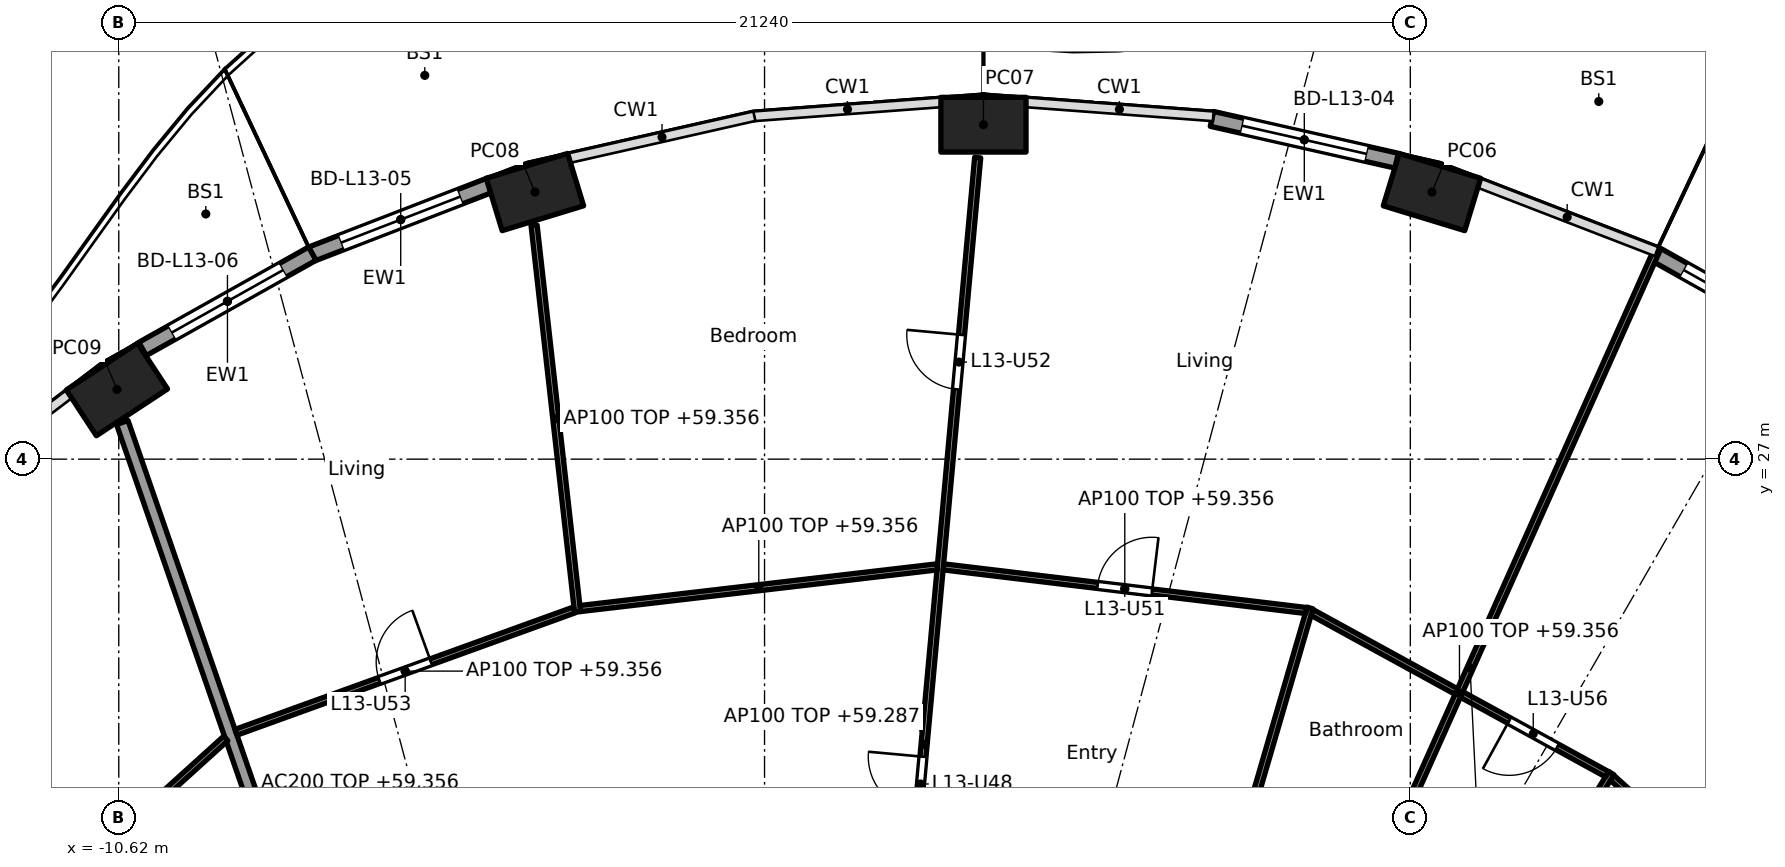
"""IFC4 building model, lengths in metres.
Left out: names, types, materials, properties, quantities, classifications, styles, units other than length and angle.
Written with IfcOpenShell. Run it as: python <this file> out.ifc"""

import sys

from ifc_helpers import new_model, si_unit, direction, frame, frame_2d, origin, origin_2d, place, context, subcontext, project, spatial, rectangle, hollow_rectangle, extrude, element, fill, save


model = new_model("IFC4")
c1 = context("Model", 3, precision=1e-05, world=origin(), true_north=direction((0.0, 1.0)))
c2 = subcontext(c1, "Body", "Model", "MODEL_VIEW")
j1 = project(units=[si_unit("LENGTHUNIT", "METRE"), si_unit("PLANEANGLEUNIT", "RADIAN")], contexts=[c1])
p1 = place(None, origin())
s1 = spatial("IfcSite", under=j1, at=p1, CompositionType="ELEMENT")
p2 = place(p1, origin())
s2 = spatial("IfcBuilding", under=s1, at=p2, CompositionType="ELEMENT")
p3 = place(p2, frame((0.0, 0.0, 56.6)))
s3 = spatial("IfcBuildingStorey", under=s2, at=p3, CompositionType="ELEMENT", Elevation=56.6)
for number, where, z_axis, x_axis in (
    (1, (10.976, 31.393, 0.0), (0.0, 0.0, 1.0), (-0.957, 0.292, 0.0)),
    (2, (3.6, 32.5, 0.0), (0.0, 0.0, 1.0), (-1.0, 0.0, 0.0)),
    (3, (-3.776, 31.393, 0.0), (0.0, 0.0, 1.0), (-0.957, -0.292, 0.0)),
    (4, (-10.65, 28.146, 0.0), (0.0, 0.0, 1.0), (-0.836, -0.549, 0.0)),
):
    element("IfcColumn", number, at=place(p3, frame(where, z_axis=z_axis, x_axis=x_axis)), inside=s3, PredefinedType="COLUMN", context=c2, shape_type="SweptSolid", body=[
        extrude(hollow_rectangle(XDim=1.4, YDim=0.9, WallThickness=0.05, at=origin_2d()), origin(), (0.0, 0.0, 1.0), 3.7),
    ])
p4 = place(p3, frame((14.637, 30.379, 0.0), z_axis=(0.0, 0.0, 1.0), x_axis=(0.872102558443, -0.489323132048, 0.0)))
e5 = element("IfcWall", 5, at=p4, inside=s3, PredefinedType="SOLIDWALL", context=c2, shape_type="SweptSolid", body=[
    extrude(rectangle(XDim=3.201, YDim=0.25, at=frame_2d((1.601, 0.0))), origin(), (0.0, 0.0, 1.0), 3.44),
])
p5 = place(p4, frame((0.551, 0.0, 0.0)))
e6 = element("IfcOpeningElement", 6, at=p5, cuts=e5, PredefinedType="OPENING", context=c2, shape_type="SweptSolid", body=[
    extrude(rectangle(XDim=2.1, YDim=2.4, at=frame_2d((1.05, 1.2))), frame((0.0, 0.135, 0.0), z_axis=(0.0, -1.0, 0.0), x_axis=(1.0, 0.0, 0.0)), (0.0, 0.0, 1.0), 0.27),
])
p6 = place(p3, frame((7.358, 32.596, 0.0), z_axis=(0.0, 0.0, 1.0), x_axis=(0.97533495413, -0.220729987208, 0.0)))
e7 = element("IfcWall", 7, at=p6, inside=s3, PredefinedType="SOLIDWALL", context=c2, shape_type="SweptSolid", body=[
    extrude(rectangle(XDim=3.115, YDim=0.25, at=frame_2d((1.557, 0.0))), origin(), (0.0, 0.0, 1.0), 3.44),
])
p7 = place(p6, frame((0.507, 0.0, 0.0)))
e8 = element("IfcOpeningElement", 8, at=p7, cuts=e7, PredefinedType="OPENING", context=c2, shape_type="SweptSolid", body=[
    extrude(rectangle(XDim=2.1, YDim=2.4, at=frame_2d((1.05, 1.2))), frame((0.0, 0.135, 0.0), z_axis=(0.0, -1.0, 0.0), x_axis=(1.0, 0.0, 0.0)), (0.0, 0.0, 1.0), 0.27),
])
p8 = place(p3, frame((-7.453, 30.371, 0.0), z_axis=(0.0, 0.0, 1.0), x_axis=(0.932809381943, 0.360370166577, 0.0)))
e9 = element("IfcWall", 9, at=p8, inside=s3, PredefinedType="SOLIDWALL", context=c2, shape_type="SweptSolid", body=[
    extrude(rectangle(XDim=3.151, YDim=0.25, at=frame_2d((1.575, 0.0))), origin(), (0.0, 0.0, 1.0), 3.44),
])
p9 = place(p8, frame((0.525, 0.0, 0.0)))
e10 = element("IfcOpeningElement", 10, at=p9, cuts=e9, PredefinedType="OPENING", context=c2, shape_type="SweptSolid", body=[
    extrude(rectangle(XDim=2.1, YDim=2.4, at=frame_2d((1.05, 1.2))), frame((0.0, 0.135, 0.0), z_axis=(0.0, -1.0, 0.0), x_axis=(1.0, 0.0, 0.0)), (0.0, 0.0, 1.0), 0.27),
])
p10 = place(p3, frame((-10.228, 28.812, 0.0), z_axis=(0.0, 0.0, 1.0), x_axis=(0.872084295691, 0.489355679653, 0.0)))
e11 = element("IfcWall", 11, at=p10, inside=s3, PredefinedType="SOLIDWALL", context=c2, shape_type="SweptSolid", body=[
    extrude(rectangle(XDim=3.201, YDim=0.25, at=frame_2d((1.601, 0.0))), origin(), (0.0, 0.0, 1.0), 3.44),
])
p11 = place(p10, frame((0.551, 0.0, 0.0)))
e12 = element("IfcOpeningElement", 12, at=p11, cuts=e11, PredefinedType="OPENING", context=c2, shape_type="SweptSolid", body=[
    extrude(rectangle(XDim=2.1, YDim=2.4, at=frame_2d((1.05, 1.2))), frame((0.0, 0.135, 0.0), z_axis=(0.0, -1.0, 0.0), x_axis=(1.0, 0.0, 0.0)), (0.0, 0.0, 1.0), 0.27),
])
p12 = place(p3, frame((-6.139, 14.829, 0.0), z_axis=(0.0, 0.0, 1.0), x_axis=(-0.327178799566, 0.944962450637, 0.0)))
e13 = element("IfcWall", 13, at=p12, inside=s3, PredefinedType="PARTITIONING", context=c2, shape_type="SweptSolid", body=[
    extrude(rectangle(XDim=13.517, YDim=0.2, at=frame_2d((6.759, 0.0))), origin(), (0.0, 0.0, 1.0), 2.756),
])
p13 = place(p3, frame((18.285, 17.877, 0.0), z_axis=(0.0, 0.0, 1.0), x_axis=(-0.745806142791, 0.666163041136, 0.0)))
e14 = element("IfcWall", 14, at=p13, inside=s3, PredefinedType="PARTITIONING", context=c2, shape_type="SweptSolid", body=[
    extrude(rectangle(XDim=5.831, YDim=0.1, at=frame_2d((2.915, 0.0))), origin(), (0.0, 0.0, 1.0), 2.756),
])
p14 = place(p13, frame((1.008, 0.0, 0.0)))
e15 = element("IfcOpeningElement", 15, at=p14, cuts=e14, PredefinedType="OPENING", context=c2, shape_type="SweptSolid", body=[
    extrude(rectangle(XDim=0.9, YDim=2.1, at=frame_2d((0.45, 1.05))), frame((0.0, 0.06, 0.0), z_axis=(0.0, -1.0, 0.0), x_axis=(1.0, 0.0, 0.0)), (0.0, 0.0, 1.0), 0.12),
])
p15 = place(p3, frame((10.003, 15.503, 0.0), z_axis=(0.0, 0.0, 1.0), x_axis=(0.52645953022, 0.850200189979, 0.0)))
e16 = element("IfcWall", 16, at=p15, inside=s3, PredefinedType="PARTITIONING", context=c2, shape_type="SweptSolid", body=[
    extrude(rectangle(XDim=7.45, YDim=0.1, at=frame_2d((3.725, 0.0))), origin(), (0.0, 0.0, 1.0), 2.756),
])
p16 = place(p3, frame((13.855, 21.818, 0.0), z_axis=(0.0, 0.0, 1.0), x_axis=(-0.876794415294, 0.480865421203, 0.0)))
e17 = element("IfcWall", 17, at=p16, inside=s3, PredefinedType="PARTITIONING", context=c2, shape_type="SweptSolid", body=[
    extrude(rectangle(XDim=5.536, YDim=0.1, at=frame_2d((2.768, 0.0))), origin(), (0.0, 0.0, 1.0), 2.756),
])
p17 = place(p16, frame((0.934, 0.0, 0.0)))
e18 = element("IfcOpeningElement", 18, at=p17, cuts=e17, PredefinedType="OPENING", context=c2, shape_type="SweptSolid", body=[
    extrude(rectangle(XDim=0.9, YDim=2.1, at=frame_2d((0.45, 1.05))), frame((0.0, 0.06, 0.0), z_axis=(0.0, -1.0, 0.0), x_axis=(1.0, 0.0, 0.0)), (0.0, 0.0, 1.0), 0.12),
])
p18 = place(p3, frame((8.524, 16.676, 0.0), z_axis=(0.0, 0.0, 1.0), x_axis=(0.408065177262, 0.912952797852, 0.0)))
e19 = element("IfcWall", 19, at=p18, inside=s3, PredefinedType="PARTITIONING", context=c2, shape_type="SweptSolid", body=[
    extrude(rectangle(XDim=15.089, YDim=0.1, at=frame_2d((7.544, 0.0))), origin(), (0.0, 0.0, 1.0), 2.837),
])
p19 = place(p3, frame((6.137, 14.83, 0.0), z_axis=(0.0, 0.0, 1.0), x_axis=(0.279843546189, 0.960045618529, 0.0)))
e20 = element("IfcWall", 20, at=p19, inside=s3, PredefinedType="PARTITIONING", context=c2, shape_type="SweptSolid", body=[
    extrude(rectangle(XDim=10.127, YDim=0.1, at=frame_2d((5.063, 0.0))), origin(), (0.0, 0.0, 1.0), 3.44),
])
p20 = place(p19, frame((1.334, 0.0, 0.0)))
e21 = element("IfcOpeningElement", 21, at=p20, cuts=e20, PredefinedType="OPENING", context=c2, shape_type="SweptSolid", body=[
    extrude(rectangle(XDim=0.9, YDim=2.1, at=frame_2d((0.45, 1.05))), frame((0.0, 0.06, 0.0), z_axis=(0.0, -1.0, 0.0), x_axis=(1.0, 0.0, 0.0)), (0.0, 0.0, 1.0), 0.12),
])
p21 = place(p19, frame((6.091, 0.0, 0.0)))
e22 = element("IfcOpeningElement", 22, at=p21, cuts=e20, PredefinedType="OPENING", context=c2, shape_type="SweptSolid", body=[
    extrude(rectangle(XDim=0.9, YDim=2.1, at=frame_2d((0.45, 1.05))), frame((0.0, 0.06, 0.0), z_axis=(0.0, -1.0, 0.0), x_axis=(1.0, 0.0, 0.0)), (0.0, 0.0, 1.0), 0.12),
])
p22 = place(p3, frame((8.907, 24.51, 0.0), z_axis=(0.0, 0.0, 1.0), x_axis=(-0.992836798252, 0.119478416615, 0.0)))
e23 = element("IfcWall", 23, at=p22, inside=s3, PredefinedType="PARTITIONING", context=c2, shape_type="SweptSolid", body=[
    extrude(rectangle(XDim=6.01, YDim=0.1, at=frame_2d((3.005, 0.0))), origin(), (0.0, 0.0, 1.0), 2.756),
])
p23 = place(p22, frame((2.555, 0.0, 0.0)))
e24 = element("IfcOpeningElement", 24, at=p23, cuts=e23, PredefinedType="OPENING", context=c2, shape_type="SweptSolid", body=[
    extrude(rectangle(XDim=0.9, YDim=2.1, at=frame_2d((0.45, 1.05))), frame((0.0, 0.06, 0.0), z_axis=(0.0, -1.0, 0.0), x_axis=(1.0, 0.0, 0.0)), (0.0, 0.0, 1.0), 0.12),
])
p24 = place(p3, frame((1.744, 12.664, 0.0), z_axis=(0.0, 0.0, 1.0), x_axis=(0.090893639596, 0.995860605849, 0.0)))
e25 = element("IfcWall", 25, at=p24, inside=s3, PredefinedType="PARTITIONING", context=c2, shape_type="SweptSolid", body=[
    extrude(rectangle(XDim=19.374, YDim=0.1, at=frame_2d((9.687, 0.0))), origin(), (0.0, 0.0, 1.0), 2.687),
])
p25 = place(p24, frame((2.27, 0.0, 0.0)))
e26 = element("IfcOpeningElement", 26, at=p25, cuts=e25, PredefinedType="OPENING", context=c2, shape_type="SweptSolid", body=[
    extrude(rectangle(XDim=0.9, YDim=2.1, at=frame_2d((0.45, 1.05))), frame((0.0, 0.06, 0.0), z_axis=(0.0, -1.0, 0.0), x_axis=(1.0, 0.0, 0.0)), (0.0, 0.0, 1.0), 0.12),
])
p26 = place(p24, frame((8.582, 0.0, 0.0)))
e27 = element("IfcOpeningElement", 27, at=p26, cuts=e25, PredefinedType="OPENING", context=c2, shape_type="SweptSolid", body=[
    extrude(rectangle(XDim=0.9, YDim=2.1, at=frame_2d((0.45, 1.05))), frame((0.0, 0.06, 0.0), z_axis=(0.0, -1.0, 0.0), x_axis=(1.0, 0.0, 0.0)), (0.0, 0.0, 1.0), 0.12),
])
p27 = place(p24, frame((15.548, 0.0, 0.0)))
e28 = element("IfcOpeningElement", 28, at=p27, cuts=e25, PredefinedType="OPENING", context=c2, shape_type="SweptSolid", body=[
    extrude(rectangle(XDim=0.9, YDim=2.1, at=frame_2d((0.45, 1.05))), frame((0.0, 0.06, 0.0), z_axis=(0.0, -1.0, 0.0), x_axis=(1.0, 0.0, 0.0)), (0.0, 0.0, 1.0), 0.12),
])
p28 = place(p3, frame((2.842, 25.229, 0.0), z_axis=(0.0, 0.0, 1.0), x_axis=(-0.993255612046, -0.115945198862, 0.0)))
e29 = element("IfcWall", 29, at=p28, inside=s3, PredefinedType="PARTITIONING", context=c2, shape_type="SweptSolid", body=[
    extrude(rectangle(XDim=5.913, YDim=0.1, at=frame_2d((2.956, 0.0))), origin(), (0.0, 0.0, 1.0), 2.756),
])
p29 = place(p3, frame((-3.075, 24.488, 0.0), z_axis=(0.0, 0.0, 1.0), x_axis=(-0.111705235978, 0.993741384997, 0.0)))
e30 = element("IfcWall", 30, at=p29, inside=s3, PredefinedType="PARTITIONING", context=c2, shape_type="SweptSolid", body=[
    extrude(rectangle(XDim=6.395, YDim=0.1, at=frame_2d((3.198, 0.0))), origin(), (0.0, 0.0, 1.0), 2.756),
])
p30 = place(p3, frame((-3.128, 24.521, 0.0), z_axis=(0.0, 0.0, 1.0), x_axis=(-0.940401494588, -0.340066212636, 0.0)))
e31 = element("IfcWall", 31, at=p30, inside=s3, PredefinedType="PARTITIONING", context=c2, shape_type="SweptSolid", body=[
    extrude(rectangle(XDim=5.917, YDim=0.1, at=frame_2d((2.958, 0.0))), origin(), (0.0, 0.0, 1.0), 2.756),
])
p31 = place(p30, frame((2.509, 0.0, 0.0)))
e32 = element("IfcOpeningElement", 32, at=p31, cuts=e31, PredefinedType="OPENING", context=c2, shape_type="SweptSolid", body=[
    extrude(rectangle(XDim=0.9, YDim=2.1, at=frame_2d((0.45, 1.05))), frame((0.0, 0.06, 0.0), z_axis=(0.0, -1.0, 0.0), x_axis=(1.0, 0.0, 0.0)), (0.0, 0.0, 1.0), 0.12),
])
p32 = place(p3, frame((-8.861, 22.407, 0.0), z_axis=(0.0, 0.0, 1.0), x_axis=(-0.741713303551, -0.670717060567, 0.0)))
e33 = element("IfcWall", 33, at=p32, inside=s3, PredefinedType="PARTITIONING", context=c2, shape_type="SweptSolid", body=[
    extrude(rectangle(XDim=6.059, YDim=0.1, at=frame_2d((3.03, 0.0))), origin(), (0.0, 0.0, 1.0), 2.756),
])
p33 = place(p5, origin())
e34 = element("IfcDoor", 34, at=p33, inside=s3, OperationType="SLIDING_TO_LEFT", PredefinedType="DOOR", context=c2, shape_type="SweptSolid", body=[
    extrude(rectangle(XDim=2.1, YDim=2.4, at=frame_2d((1.05, 1.2))), frame((0.0, 0.025, 0.0), z_axis=(0.0, -1.0, 0.0), x_axis=(1.0, 0.0, 0.0)), (0.0, 0.0, 1.0), 0.05),
])
fill(e6, e34)
p34 = place(p7, origin())
e35 = element("IfcDoor", 35, at=p34, inside=s3, OperationType="SLIDING_TO_LEFT", PredefinedType="DOOR", context=c2, shape_type="SweptSolid", body=[
    extrude(rectangle(XDim=2.1, YDim=2.4, at=frame_2d((1.05, 1.2))), frame((0.0, 0.025, 0.0), z_axis=(0.0, -1.0, 0.0), x_axis=(1.0, 0.0, 0.0)), (0.0, 0.0, 1.0), 0.05),
])
fill(e8, e35)
p35 = place(p9, origin())
e36 = element("IfcDoor", 36, at=p35, inside=s3, OperationType="SLIDING_TO_LEFT", PredefinedType="DOOR", context=c2, shape_type="SweptSolid", body=[
    extrude(rectangle(XDim=2.1, YDim=2.4, at=frame_2d((1.05, 1.2))), frame((0.0, 0.025, 0.0), z_axis=(0.0, -1.0, 0.0), x_axis=(1.0, 0.0, 0.0)), (0.0, 0.0, 1.0), 0.05),
])
fill(e10, e36)
p36 = place(p11, origin())
e37 = element("IfcDoor", 37, at=p36, inside=s3, OperationType="SLIDING_TO_LEFT", PredefinedType="DOOR", context=c2, shape_type="SweptSolid", body=[
    extrude(rectangle(XDim=2.1, YDim=2.4, at=frame_2d((1.05, 1.2))), frame((0.0, 0.025, 0.0), z_axis=(0.0, -1.0, 0.0), x_axis=(1.0, 0.0, 0.0)), (0.0, 0.0, 1.0), 0.05),
])
fill(e12, e37)
p37 = place(p26, origin())
e38 = element("IfcDoor", 38, at=p37, inside=s3, OperationType="SINGLE_SWING_RIGHT", PredefinedType="DOOR", context=c2, shape_type="SweptSolid", body=[
    extrude(rectangle(XDim=0.9, YDim=2.1, at=frame_2d((0.45, 1.05))), frame((0.0, 0.025, 0.0), z_axis=(0.0, -1.0, 0.0), x_axis=(1.0, 0.0, 0.0)), (0.0, 0.0, 1.0), 0.05),
])
fill(e27, e38)
p38 = place(p23, frame((0.9, 0.0, 0.0), x_axis=(-1.0, 0.0, 0.0)))
e39 = element("IfcDoor", 39, at=p38, inside=s3, OperationType="SINGLE_SWING_RIGHT", PredefinedType="DOOR", context=c2, shape_type="SweptSolid", body=[
    extrude(rectangle(XDim=0.9, YDim=2.1, at=frame_2d((0.45, 1.05))), frame((0.0, 0.025, 0.0), z_axis=(0.0, -1.0, 0.0), x_axis=(1.0, 0.0, 0.0)), (0.0, 0.0, 1.0), 0.05),
])
fill(e24, e39)
p39 = place(p27, origin())
e40 = element("IfcDoor", 40, at=p39, inside=s3, OperationType="SINGLE_SWING_RIGHT", PredefinedType="DOOR", context=c2, shape_type="SweptSolid", body=[
    extrude(rectangle(XDim=0.9, YDim=2.1, at=frame_2d((0.45, 1.05))), frame((0.0, 0.025, 0.0), z_axis=(0.0, -1.0, 0.0), x_axis=(1.0, 0.0, 0.0)), (0.0, 0.0, 1.0), 0.05),
])
fill(e28, e40)
p40 = place(p31, frame((0.9, 0.0, 0.0), x_axis=(-1.0, 0.0, 0.0)))
e41 = element("IfcDoor", 41, at=p40, inside=s3, OperationType="SINGLE_SWING_RIGHT", PredefinedType="DOOR", context=c2, shape_type="SweptSolid", body=[
    extrude(rectangle(XDim=0.9, YDim=2.1, at=frame_2d((0.45, 1.05))), frame((0.0, 0.025, 0.0), z_axis=(0.0, -1.0, 0.0), x_axis=(1.0, 0.0, 0.0)), (0.0, 0.0, 1.0), 0.05),
])
fill(e32, e41)
p41 = place(p17, origin())
e42 = element("IfcDoor", 42, at=p41, inside=s3, OperationType="SINGLE_SWING_RIGHT", PredefinedType="DOOR", context=c2, shape_type="SweptSolid", body=[
    extrude(rectangle(XDim=0.9, YDim=2.1, at=frame_2d((0.45, 1.05))), frame((0.0, 0.025, 0.0), z_axis=(0.0, -1.0, 0.0), x_axis=(1.0, 0.0, 0.0)), (0.0, 0.0, 1.0), 0.05),
])
fill(e18, e42)
save(model, sys.argv[1])
